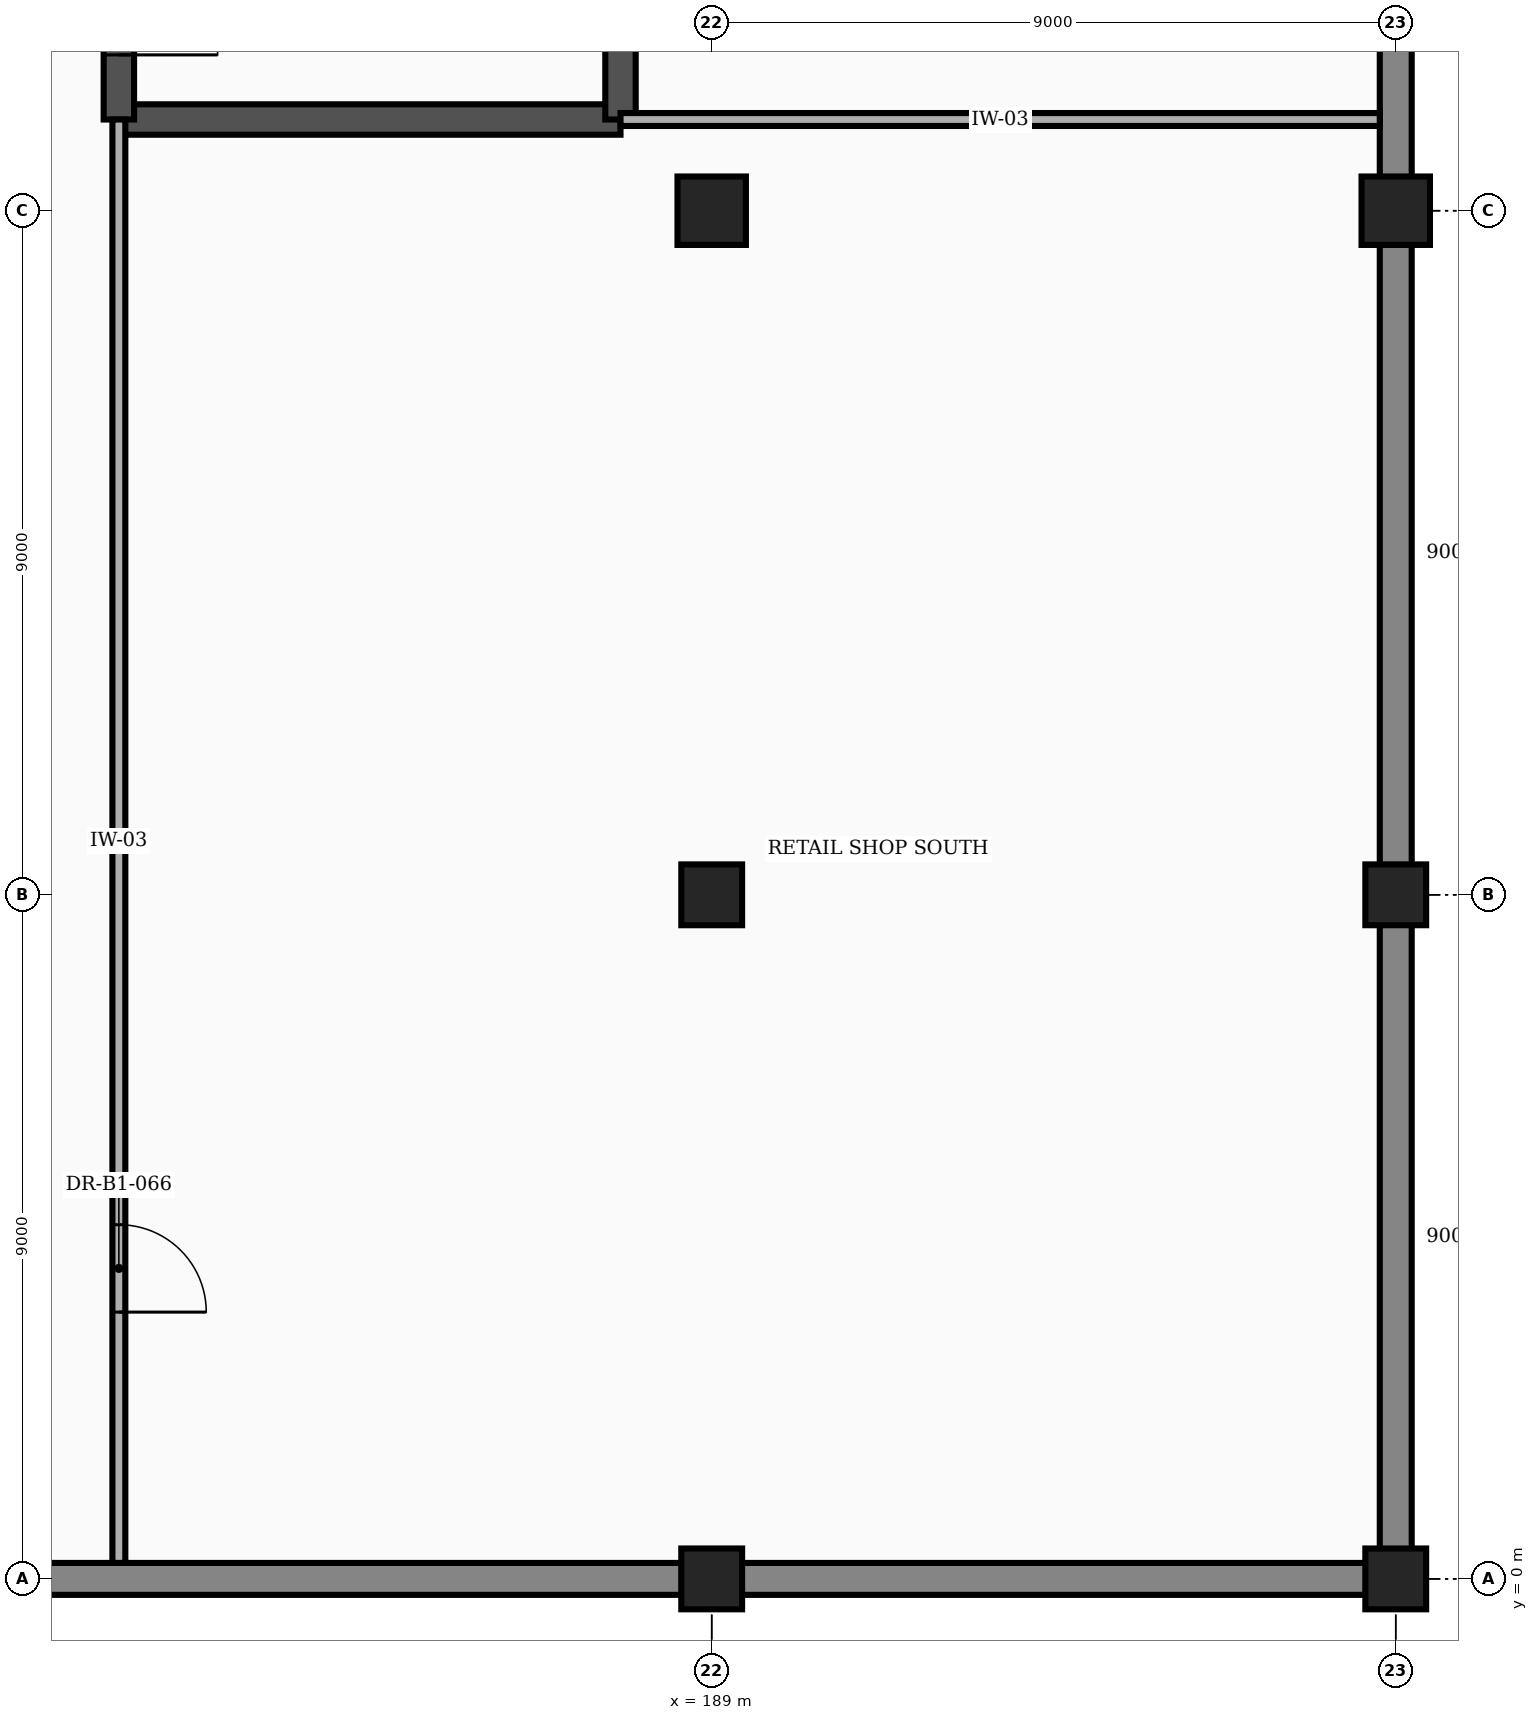
"""IFC4 building model, lengths in metres.
Left out: names, types, materials, properties, quantities, classifications, styles, units other than length and angle.
Written with IfcOpenShell. Run it as: python <this file> out.ifc"""

import sys

from ifc_helpers import new_model, si_unit, direction, frame, frame_2d, origin, origin_2d, place, context, subcontext, project, spatial, rectangle, extrude, element, fill, save


model = new_model("IFC4")
c1 = context("Model", 3, precision=1e-05, world=origin(), true_north=direction((0.0, 1.0)))
c2 = subcontext(c1, "Body", "Model", "MODEL_VIEW")
j1 = project(units=[si_unit("LENGTHUNIT", "METRE"), si_unit("PLANEANGLEUNIT", "RADIAN")], contexts=[c1])
p1 = place(None, origin())
s1 = spatial("IfcSite", under=j1, at=p1, CompositionType="ELEMENT")
p2 = place(p1, origin())
s2 = spatial("IfcBuilding", under=s1, at=p2, CompositionType="ELEMENT")
p3 = place(p2, frame((0.0, 0.0, -4.5)))
s3 = spatial("IfcBuildingStorey", under=s2, at=p3, CompositionType="ELEMENT", Elevation=-4.5)
for number, where, z_axis, x_axis in (
    (1, (189.0, 0.0, -0.45), (0.0, 0.0, 1.0), (1.0, 0.0, 0.0)),
    (2, (189.0, 9.0, -0.45), (0.0, 0.0, 1.0), (1.0, 0.0, 0.0)),
):
    element("IfcColumn", number, at=place(p3, frame(where, z_axis=z_axis, x_axis=x_axis)), inside=s3, PredefinedType="COLUMN", context=c2, shape_type="SweptSolid", body=[
        extrude(rectangle(XDim=0.8, YDim=0.8, at=origin_2d()), origin(), (0.0, 0.0, 1.0), 4.95),
    ])
p4 = place(p3, frame((189.0, 18.0, -0.45), z_axis=(0.0, 0.0, 1.0), x_axis=(1.0, 0.0, 0.0)))
e3 = element("IfcColumn", 3, at=p4, inside=s3, PredefinedType="COLUMN", context=c2, shape_type="SweptSolid", body=[
    extrude(rectangle(XDim=0.9, YDim=0.9, at=origin_2d()), origin(), (0.0, 0.0, 1.0), 4.95),
])
for number, where, z_axis, x_axis in (
    (4, (198.0, 0.0, -0.45), (0.0, 0.0, 1.0), (1.0, 0.0, 0.0)),
    (5, (198.0, 9.0, -0.45), (0.0, 0.0, 1.0), (1.0, 0.0, 0.0)),
):
    element("IfcColumn", number, at=place(p3, frame(where, z_axis=z_axis, x_axis=x_axis)), inside=s3, PredefinedType="COLUMN", context=c2, shape_type="SweptSolid", body=[
        extrude(rectangle(XDim=0.8, YDim=0.8, at=origin_2d()), origin(), (0.0, 0.0, 1.0), 4.95),
    ])
p5 = place(p3, frame((198.0, 18.0, -0.45), z_axis=(0.0, 0.0, 1.0), x_axis=(1.0, 0.0, 0.0)))
e6 = element("IfcColumn", 6, at=p5, inside=s3, PredefinedType="COLUMN", context=c2, shape_type="SweptSolid", body=[
    extrude(rectangle(XDim=0.9, YDim=0.9, at=origin_2d()), origin(), (0.0, 0.0, 1.0), 4.95),
])
p6 = place(p3, frame((171.392, 0.0, 0.0), z_axis=(0.0, 0.0, 1.0), x_axis=(1.0, 0.0, 0.0)))
e7 = element("IfcWall", 7, at=p6, inside=s3, PredefinedType="STANDARD", context=c2, shape_type="SweptSolid", body=[
    extrude(rectangle(XDim=17.216, YDim=0.42, at=frame_2d((8.608, 0.0))), origin(), (0.0, 0.0, 1.0), 3.7),
])
for number, where, z_axis, x_axis in (
    (8, (189.392, 0.0, 0.0), (0.0, 0.0, 1.0), (1.0, 0.0, 0.0)),
    (9, (198.0, 0.392, 0.0), (0.0, 0.0, 1.0), (0.0, 1.0, 0.0)),
):
    element("IfcWall", number, at=place(p3, frame(where, z_axis=z_axis, x_axis=x_axis)), inside=s3, PredefinedType="STANDARD", context=c2, shape_type="SweptSolid", body=[
        extrude(rectangle(XDim=8.216, YDim=0.42, at=frame_2d((4.108, 0.0))), origin(), (0.0, 0.0, 1.0), 3.7),
    ])
p7 = place(p3, frame((198.0, 9.392, 0.0), z_axis=(0.0, 0.0, 1.0), x_axis=(0.0, 1.0, 0.0)))
e10 = element("IfcWall", 10, at=p7, inside=s3, PredefinedType="STANDARD", context=c2, shape_type="SweptSolid", body=[
    extrude(rectangle(XDim=8.166, YDim=0.42, at=frame_2d((4.083, 0.0))), origin(), (0.0, 0.0, 1.0), 3.7),
])
p8 = place(p3, frame((198.0, 18.442, 0.0), z_axis=(0.0, 0.0, 1.0), x_axis=(0.0, 1.0, 0.0)))
e11 = element("IfcWall", 11, at=p8, inside=s3, PredefinedType="STANDARD", context=c2, shape_type="SweptSolid", body=[
    extrude(rectangle(XDim=17.116, YDim=0.42, at=frame_2d((8.558, 0.0))), origin(), (0.0, 0.0, 1.0), 3.7),
])
p9 = place(p3, frame((181.2, 19.2, 0.0), z_axis=(0.0, 0.0, 1.0), x_axis=(1.0, 0.0, 0.0)))
e12 = element("IfcWall", 12, at=p9, inside=s3, PredefinedType="SHEAR", context=c2, shape_type="SweptSolid", body=[
    extrude(rectangle(XDim=6.6, YDim=0.4, at=frame_2d((3.3, 0.0))), origin(), (0.0, 0.0, 1.0), 4.24),
])
p10 = place(p3, frame((187.8, 19.2, 0.0), z_axis=(0.0, 0.0, 1.0), x_axis=(0.0, 1.0, 0.0)))
e13 = element("IfcWall", 13, at=p10, inside=s3, PredefinedType="SHEAR", context=c2, shape_type="SweptSolid", body=[
    extrude(rectangle(XDim=15.6, YDim=0.4, at=frame_2d((7.8, 0.0))), origin(), (0.0, 0.0, 1.0), 4.24),
])
p11 = place(p3, frame((181.2, 19.2, 0.0), z_axis=(0.0, 0.0, 1.0), x_axis=(0.0, 1.0, 0.0)))
e14 = element("IfcWall", 14, at=p11, inside=s3, PredefinedType="SHEAR", context=c2, shape_type="SweptSolid", body=[
    extrude(rectangle(XDim=9.56, YDim=0.4, at=frame_2d((4.78, 0.0))), origin(), (0.0, 0.0, 1.0), 4.24),
])
p12 = place(p11, frame((0.85, 0.0, 0.0)))
e15 = element("IfcOpeningElement", 15, at=p12, cuts=e14, PredefinedType="OPENING", context=c2, shape_type="SweptSolid", body=[
    extrude(rectangle(XDim=1.3, YDim=2.2, at=frame_2d((0.65, 1.1))), frame((0.0, 0.212, 0.0), z_axis=(0.0, -1.0, 0.0), x_axis=(1.0, 0.0, 0.0)), (0.0, 0.0, 1.0), 0.424),
])
p13 = place(p3, frame((187.8, 19.2, 0.0), z_axis=(0.0, 0.0, 1.0), x_axis=(1.0, 0.0, 0.0)))
e16 = element("IfcWall", 16, at=p13, inside=s3, PredefinedType="PARTITIONING", context=c2, shape_type="SweptSolid", body=[
    extrude(rectangle(XDim=9.99, YDim=0.17, at=frame_2d((4.995, 0.0))), origin(), (0.0, 0.0, 1.0), 4.24),
])
p14 = place(p3, frame((181.2, 0.21, 0.0), z_axis=(0.0, 0.0, 1.0), x_axis=(0.0, 1.0, 0.0)))
e17 = element("IfcWall", 17, at=p14, inside=s3, PredefinedType="PARTITIONING", context=c2, shape_type="SweptSolid", body=[
    extrude(rectangle(XDim=18.99, YDim=0.17, at=frame_2d((9.495, 0.0))), origin(), (0.0, 0.0, 1.0), 4.24),
])
p15 = place(p14, frame((3.3, 0.0, 0.0)))
e18 = element("IfcOpeningElement", 18, at=p15, cuts=e17, PredefinedType="OPENING", context=c2, shape_type="SweptSolid", body=[
    extrude(rectangle(XDim=1.15, YDim=2.15, at=frame_2d((0.575, 1.075))), frame((0.0, 0.097, 0.0), z_axis=(0.0, -1.0, 0.0), x_axis=(1.0, 0.0, 0.0)), (0.0, 0.0, 1.0), 0.194),
])
p16 = place(p12, frame((1.3, 0.0, 0.0), z_axis=(0.0, 0.0, 1.0), x_axis=(-1.0, 0.0, 0.0)))
e19 = element("IfcDoor", 19, at=p16, inside=s3, OperationType="SINGLE_SWING_RIGHT", PredefinedType="DOOR", context=c2, shape_type="SweptSolid", body=[
    extrude(rectangle(XDim=1.3, YDim=2.2, at=frame_2d((0.65, 1.1))), frame((0.0, 0.025, 0.0), z_axis=(0.0, -1.0, 0.0), x_axis=(1.0, 0.0, 0.0)), (0.0, 0.0, 1.0), 0.05),
])
fill(e15, e19)
p17 = place(p15, frame((1.15, 0.0, 0.0), z_axis=(0.0, 0.0, 1.0), x_axis=(-1.0, 0.0, 0.0)))
e20 = element("IfcDoor", 20, at=p17, inside=s3, OperationType="SINGLE_SWING_RIGHT", PredefinedType="DOOR", context=c2, shape_type="SweptSolid", body=[
    extrude(rectangle(XDim=1.15, YDim=2.15, at=frame_2d((0.575, 1.075))), frame((0.0, 0.025, 0.0), z_axis=(0.0, -1.0, 0.0), x_axis=(1.0, 0.0, 0.0)), (0.0, 0.0, 1.0), 0.05),
])
fill(e18, e20)
save(model, sys.argv[1])
